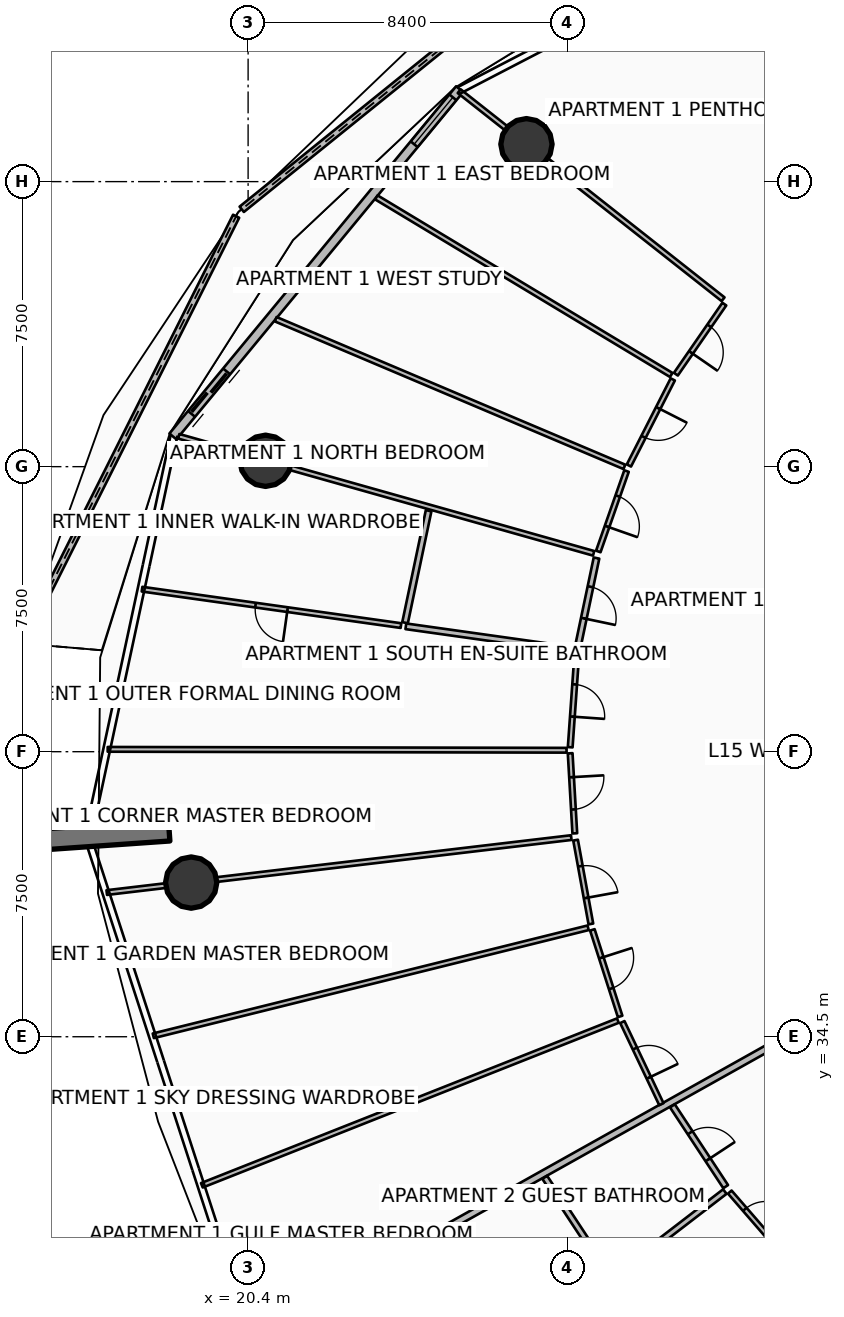
"""IFC4 building model, lengths in metres.
Left out: names, types, materials, properties, quantities, classifications, styles, units other than length and angle.
Written with IfcOpenShell. Run it as: python <this file> out.ifc"""

import sys

from ifc_helpers import new_model, si_unit, direction, frame, frame_2d, origin, origin_2d, place, context, subcontext, project, spatial, polyline, rectangle, circle, outline, extrude, element, fill, save


model = new_model("IFC4")
c1 = context("Model", 3, precision=1e-05, world=origin(), true_north=direction((0.0, 1.0)))
c2 = subcontext(c1, "Body", "Model", "MODEL_VIEW")
j1 = project(units=[si_unit("LENGTHUNIT", "METRE"), si_unit("PLANEANGLEUNIT", "RADIAN")], contexts=[c1])
p1 = place(None, origin())
s1 = spatial("IfcSite", under=j1, at=p1, CompositionType="ELEMENT")
p2 = place(p1, origin())
s2 = spatial("IfcBuilding", under=s1, at=p2, CompositionType="ELEMENT")
p3 = place(p2, frame((0.0, 0.0, 63.9)))
s3 = spatial("IfcBuildingStorey", under=s2, at=p3, CompositionType="ELEMENT", Elevation=63.9)
p4 = place(p3, frame((18.322, 39.925, 0.0), z_axis=(0.0, 0.0, 1.0), x_axis=(-0.997564163539, -0.069754853754, 0.0)))
e1 = element("IfcWall", 1, at=p4, inside=s3, PredefinedType="SOLIDWALL", context=c2, shape_type="SweptSolid", body=[
    extrude(rectangle(XDim=3.5, YDim=0.55, at=frame_2d((1.75, 0.0))), origin(), (0.0, 0.0, 1.0), 3.75),
])
for number, where, z_axis, x_axis in (
    (2, (27.724, 57.984, 0.0), (0.0, 0.0, 1.0), (1.0, 0.0, 0.0)),
    (3, (20.859, 49.655, 0.0), (0.0, 0.0, 1.0), (1.0, 0.0, 0.0)),
    (4, (18.902, 38.556, 0.0), (0.0, 0.0, 1.0), (1.0, 0.0, 0.0)),
):
    element("IfcColumn", number, at=place(p3, frame(where, z_axis=z_axis, x_axis=x_axis)), inside=s3, PredefinedType="COLUMN", context=c2, shape_type="SweptSolid", body=[
        extrude(circle(Radius=0.675, at=origin_2d()), origin(), (0.0, 0.0, 1.0), 3.5),
    ])
p5 = place(p3, frame((29.318, 63.605, 0.0), z_axis=(0.0, 0.0, 1.0), x_axis=(-0.778164801363, -0.628060141961, 0.0)))
e5 = element("IfcWall", 5, at=p5, inside=s3, PredefinedType="PARAPET", context=c2, shape_type="SweptSolid", body=[
    extrude(outline(polyline([(0.0, 0.0), (11.677, 0.0), (11.677, 1.148), (5.838, 1.127), (0.0, 1.224), (0.0, 0.0)])), frame((0.0, 0.09, 0.0), z_axis=(0.0, -1.0, 0.0), x_axis=(1.0, 0.0, 0.0)), (0.0, 0.0, 1.0), 0.18),
])
p6 = place(p3, frame((20.085, 56.089, 0.0), z_axis=(0.0, 0.0, 1.0), x_axis=(-0.448439969312, -0.893812952425, 0.0)))
e6 = element("IfcWall", 6, at=p6, inside=s3, PredefinedType="PARAPET", context=c2, shape_type="SweptSolid", body=[
    extrude(outline(polyline([(0.0, 0.0), (12.577, 0.0), (12.577, 1.483), (6.289, 1.284), (0.0, 1.148), (0.0, 0.0)])), frame((0.0, 0.09, 0.0), z_axis=(0.0, -1.0, 0.0), x_axis=(1.0, 0.0, 0.0)), (0.0, 0.0, 1.0), 0.18),
])
p7 = place(p3, frame((25.967, 59.433, 0.0), z_axis=(0.0, 0.0, 1.0), x_axis=(-0.636674332663, -0.771132799281, 0.0)))
e7 = element("IfcWall", 7, at=p7, inside=s3, PredefinedType="SOLIDWALL", context=c2, shape_type="SweptSolid", body=[
    extrude(rectangle(XDim=11.851, YDim=0.24, at=frame_2d((5.926, 0.0))), origin(), (0.0, 0.0, 1.0), 2.45),
])
p8 = place(p7, frame((9.631, 0.0, 0.0)))
e8 = element("IfcOpeningElement", 8, at=p8, cuts=e7, PredefinedType="OPENING", context=c2, shape_type="SweptSolid", body=[
    extrude(rectangle(XDim=1.45, YDim=2.15, at=frame_2d((0.725, 1.075))), frame((0.0, 0.13, 0.0), z_axis=(0.0, -1.0, 0.0), x_axis=(1.0, 0.0, 0.0)), (0.0, 0.0, 1.0), 0.26),
])
p9 = place(p7, frame((0.28, 0.0, 0.65)))
e9 = element("IfcOpeningElement", 9, at=p9, cuts=e7, PredefinedType="OPENING", context=c2, shape_type="SweptSolid", body=[
    extrude(rectangle(XDim=1.6, YDim=1.5, at=frame_2d((0.8, 0.75))), frame((0.0, 0.13, 0.0), z_axis=(0.0, -1.0, 0.0), x_axis=(1.0, 0.0, 0.0)), (0.0, 0.0, 1.0), 0.26),
])
p10 = place(p3, frame((34.954, 34.694, 0.0), z_axis=(0.0, 0.0, 1.0), x_axis=(-0.872493465611, -0.488625779577, 0.0)))
e10 = element("IfcWall", 10, at=p10, inside=s3, PredefinedType="PARTITIONING", context=c2, shape_type="SweptSolid", body=[
    extrude(rectangle(XDim=16.586, YDim=0.18, at=frame_2d((8.293, 0.0))), origin(), (0.0, 0.0, 1.0), 2.867),
])
p11 = place(p3, frame((32.898, 53.905, 0.0), z_axis=(0.0, 0.0, 1.0), x_axis=(-0.78532854108, 0.619079221558, 0.0)))
e11 = element("IfcWall", 11, at=p11, inside=s3, PredefinedType="PARTITIONING", context=c2, shape_type="SweptSolid", body=[
    extrude(rectangle(XDim=8.842, YDim=0.125, at=frame_2d((4.421, 0.0))), origin(), (0.0, 0.0, 1.0), 2.867),
])
p12 = place(p3, frame((31.534, 51.913, 0.0), z_axis=(0.0, 0.0, 1.0), x_axis=(-0.856706990958, 0.515803384676, 0.0)))
e12 = element("IfcWall", 12, at=p12, inside=s3, PredefinedType="PARTITIONING", context=c2, shape_type="SweptSolid", body=[
    extrude(rectangle(XDim=9.057, YDim=0.125, at=frame_2d((4.528, 0.0))), origin(), (0.0, 0.0, 1.0), 2.94),
])
p13 = place(p3, frame((30.301, 49.494, 0.0), z_axis=(0.0, 0.0, 1.0), x_axis=(-0.920840746031, 0.389938867579, 0.0)))
e13 = element("IfcWall", 13, at=p13, inside=s3, PredefinedType="PARTITIONING", context=c2, shape_type="SweptSolid", body=[
    extrude(rectangle(XDim=9.966, YDim=0.125, at=frame_2d((4.983, 0.0))), origin(), (0.0, 0.0, 1.0), 2.94),
])
p14 = place(p3, frame((32.931, 53.778, 0.0), z_axis=(0.0, 0.0, 1.0), x_axis=(-0.568541738061, -0.822654418382, 0.0)))
e14 = element("IfcWall", 14, at=p14, inside=s3, PredefinedType="PARTITIONING", context=c2, shape_type="SweptSolid", body=[
    extrude(rectangle(XDim=2.242, YDim=0.125, at=frame_2d((1.121, 0.0))), origin(), (0.0, 0.0, 1.0), 2.867),
])
p15 = place(p14, frame((0.696, 0.0, 0.0)))
e15 = element("IfcOpeningElement", 15, at=p15, cuts=e14, PredefinedType="OPENING", context=c2, shape_type="SweptSolid", body=[
    extrude(rectangle(XDim=0.85, YDim=2.06, at=frame_2d((0.425, 1.03))), frame((0.0, 0.073, 0.0), z_axis=(0.0, -1.0, 0.0), x_axis=(1.0, 0.0, 0.0)), (0.0, 0.0, 1.0), 0.145),
])
p16 = place(p3, frame((31.575, 51.796, 0.0), z_axis=(0.0, 0.0, 1.0), x_axis=(-0.454037986735, -0.890982326762, 0.0)))
e16 = element("IfcWall", 16, at=p16, inside=s3, PredefinedType="PARTITIONING", context=c2, shape_type="SweptSolid", body=[
    extrude(rectangle(XDim=2.542, YDim=0.125, at=frame_2d((1.271, 0.0))), origin(), (0.0, 0.0, 1.0), 2.94),
])
p17 = place(p16, frame((0.846, 0.0, 0.0)))
e17 = element("IfcOpeningElement", 17, at=p17, cuts=e16, PredefinedType="OPENING", context=c2, shape_type="SweptSolid", body=[
    extrude(rectangle(XDim=0.85, YDim=2.06, at=frame_2d((0.425, 1.03))), frame((0.0, 0.073, 0.0), z_axis=(0.0, -1.0, 0.0), x_axis=(1.0, 0.0, 0.0)), (0.0, 0.0, 1.0), 0.145),
])
p18 = place(p3, frame((30.358, 49.384, 0.0), z_axis=(0.0, 0.0, 1.0), x_axis=(-0.331344536708, -0.943509829304, 0.0)))
e18 = element("IfcWall", 18, at=p18, inside=s3, PredefinedType="PARTITIONING", context=c2, shape_type="SweptSolid", body=[
    extrude(rectangle(XDim=2.242, YDim=0.125, at=frame_2d((1.121, 0.0))), origin(), (0.0, 0.0, 1.0), 2.867),
])
p19 = place(p18, frame((0.696, 0.0, 0.0)))
e19 = element("IfcOpeningElement", 19, at=p19, cuts=e18, PredefinedType="OPENING", context=c2, shape_type="SweptSolid", body=[
    extrude(rectangle(XDim=0.85, YDim=2.06, at=frame_2d((0.425, 1.03))), frame((0.0, 0.073, 0.0), z_axis=(0.0, -1.0, 0.0), x_axis=(1.0, 0.0, 0.0)), (0.0, 0.0, 1.0), 0.145),
])
p20 = place(p3, frame((29.492, 47.22, 0.0), z_axis=(0.0, 0.0, 1.0), x_axis=(-0.962454721813, 0.271442274635, 0.0)))
e20 = element("IfcWall", 20, at=p20, inside=s3, PredefinedType="PARTITIONING", context=c2, shape_type="SweptSolid", body=[
    extrude(rectangle(XDim=11.344, YDim=0.125, at=frame_2d((5.672, 0.0))), origin(), (0.0, 0.0, 1.0), 2.867),
])
p21 = place(p3, frame((29.568, 47.095, 0.0), z_axis=(0.0, 0.0, 1.0), x_axis=(-0.205861309483, -0.978581177654, 0.0)))
e21 = element("IfcWall", 21, at=p21, inside=s3, PredefinedType="PARTITIONING", context=c2, shape_type="SweptSolid", body=[
    extrude(rectangle(XDim=2.392, YDim=0.15, at=frame_2d((1.196, 0.0))), origin(), (0.0, 0.0, 1.0), 2.867),
])
p22 = place(p21, frame((0.771, 0.0, 0.0)))
e22 = element("IfcOpeningElement", 22, at=p22, cuts=e21, PredefinedType="OPENING", context=c2, shape_type="SweptSolid", body=[
    extrude(rectangle(XDim=0.85, YDim=2.06, at=frame_2d((0.425, 1.03))), frame((0.0, 0.085, 0.0), z_axis=(0.0, -1.0, 0.0), x_axis=(1.0, 0.0, 0.0)), (0.0, 0.0, 1.0), 0.17),
])
p23 = place(p3, frame((25.15, 48.341, 0.0), z_axis=(0.0, 0.0, 1.0), x_axis=(-0.205879759174, -0.978577296264, 0.0)))
e23 = element("IfcWall", 23, at=p23, inside=s3, PredefinedType="PARTITIONING", context=c2, shape_type="SweptSolid", body=[
    extrude(rectangle(XDim=3.012, YDim=0.15, at=frame_2d((1.506, 0.0))), origin(), (0.0, 0.0, 1.0), 2.867),
])
p24 = place(p3, frame((28.968, 44.678, 0.0), z_axis=(0.0, 0.0, 1.0), x_axis=(-0.990240767804, 0.139367219172, 0.0)))
e24 = element("IfcWall", 24, at=p24, inside=s3, PredefinedType="PARTITIONING", context=c2, shape_type="SweptSolid", body=[
    extrude(rectangle(XDim=4.46, YDim=0.15, at=frame_2d((2.23, 0.0))), origin(), (0.0, 0.0, 1.0), 2.94),
])
p25 = place(p3, frame((24.422, 45.318, 0.0), z_axis=(0.0, 0.0, 1.0), x_axis=(-0.990243959665, 0.139344538274, 0.0)))
e25 = element("IfcWall", 25, at=p25, inside=s3, PredefinedType="PARTITIONING", context=c2, shape_type="SweptSolid", body=[
    extrude(rectangle(XDim=6.88, YDim=0.125, at=frame_2d((3.44, 0.0))), origin(), (0.0, 0.0, 1.0), 2.94),
])
p26 = place(p25, frame((3.015, 0.0, 0.0)))
e26 = element("IfcOpeningElement", 26, at=p26, cuts=e25, PredefinedType="OPENING", context=c2, shape_type="SweptSolid", body=[
    extrude(rectangle(XDim=0.85, YDim=2.06, at=frame_2d((0.425, 1.03))), frame((0.0, 0.073, 0.0), z_axis=(0.0, -1.0, 0.0), x_axis=(1.0, 0.0, 0.0)), (0.0, 0.0, 1.0), 0.145),
])
p27 = place(p3, frame((28.78, 42.038, 0.0), z_axis=(0.0, 0.0, 1.0), x_axis=(-0.999998036955, 0.001981435282, 0.0)))
e27 = element("IfcWall", 27, at=p27, inside=s3, PredefinedType="PARTITIONING", context=c2, shape_type="SweptSolid", body=[
    extrude(rectangle(XDim=12.075, YDim=0.125, at=frame_2d((6.038, 0.0))), origin(), (0.0, 0.0, 1.0), 2.94),
])
p28 = place(p3, frame((29.05, 44.576, 0.0), z_axis=(0.0, 0.0, 1.0), x_axis=(-0.070831673661, -0.997488282641, 0.0)))
e28 = element("IfcWall", 28, at=p28, inside=s3, PredefinedType="PARTITIONING", context=c2, shape_type="SweptSolid", body=[
    extrude(rectangle(XDim=2.464, YDim=0.125, at=frame_2d((1.232, 0.0))), origin(), (0.0, 0.0, 1.0), 2.94),
])
p29 = place(p28, frame((0.807, 0.0, 0.0)))
e29 = element("IfcOpeningElement", 29, at=p29, cuts=e28, PredefinedType="OPENING", context=c2, shape_type="SweptSolid", body=[
    extrude(rectangle(XDim=0.85, YDim=2.06, at=frame_2d((0.425, 1.03))), frame((0.0, 0.073, 0.0), z_axis=(0.0, -1.0, 0.0), x_axis=(1.0, 0.0, 0.0)), (0.0, 0.0, 1.0), 0.145),
])
p30 = place(p3, frame((28.875, 41.958, 0.0), z_axis=(0.0, 0.0, 1.0), x_axis=(0.057962417622, -0.998318765797, 0.0)))
e30 = element("IfcWall", 30, at=p30, inside=s3, PredefinedType="PARTITIONING", context=c2, shape_type="SweptSolid", body=[
    extrude(rectangle(XDim=2.11, YDim=0.125, at=frame_2d((1.055, 0.0))), origin(), (0.0, 0.0, 1.0), 2.867),
])
p31 = place(p30, frame((0.63, 0.0, 0.0)))
e31 = element("IfcOpeningElement", 31, at=p31, cuts=e30, PredefinedType="OPENING", context=c2, shape_type="SweptSolid", body=[
    extrude(rectangle(XDim=0.85, YDim=2.06, at=frame_2d((0.425, 1.03))), frame((0.0, 0.073, 0.0), z_axis=(0.0, -1.0, 0.0), x_axis=(1.0, 0.0, 0.0)), (0.0, 0.0, 1.0), 0.145),
])
p32 = place(p3, frame((28.903, 39.74, 0.0), z_axis=(0.0, 0.0, 1.0), x_axis=(-0.993068040113, -0.117540919282, 0.0)))
e32 = element("IfcWall", 32, at=p32, inside=s3, PredefinedType="PARTITIONING", context=c2, shape_type="SweptSolid", body=[
    extrude(rectangle(XDim=12.309, YDim=0.125, at=frame_2d((6.154, 0.0))), origin(), (0.0, 0.0, 1.0), 2.867),
])
p33 = place(p3, frame((29.347, 37.366, 0.0), z_axis=(0.0, 0.0, 1.0), x_axis=(-0.970510462135, -0.241059002917, 0.0)))
e33 = element("IfcWall", 33, at=p33, inside=s3, PredefinedType="PARTITIONING", context=c2, shape_type="SweptSolid", body=[
    extrude(rectangle(XDim=11.79, YDim=0.125, at=frame_2d((5.895, 0.0))), origin(), (0.0, 0.0, 1.0), 2.94),
])
p34 = place(p3, frame((30.13, 34.925, 0.0), z_axis=(0.0, 0.0, 1.0), x_axis=(-0.929770978957, -0.368138461302, 0.0)))
e34 = element("IfcWall", 34, at=p34, inside=s3, PredefinedType="PARTITIONING", context=c2, shape_type="SweptSolid", body=[
    extrude(rectangle(XDim=11.773, YDim=0.125, at=frame_2d((5.887, 0.0))), origin(), (0.0, 0.0, 1.0), 2.94),
])
p35 = place(p3, frame((29.017, 39.673, 0.0), z_axis=(0.0, 0.0, 1.0), x_axis=(0.179632658462, -0.983733758704, 0.0)))
e35 = element("IfcWall", 35, at=p35, inside=s3, PredefinedType="PARTITIONING", context=c2, shape_type="SweptSolid", body=[
    extrude(rectangle(XDim=2.242, YDim=0.125, at=frame_2d((1.121, 0.0))), origin(), (0.0, 0.0, 1.0), 2.867),
])
p36 = place(p35, frame((0.696, 0.0, 0.0)))
e36 = element("IfcOpeningElement", 36, at=p36, cuts=e35, PredefinedType="OPENING", context=c2, shape_type="SweptSolid", body=[
    extrude(rectangle(XDim=0.85, YDim=2.06, at=frame_2d((0.425, 1.03))), frame((0.0, 0.073, 0.0), z_axis=(0.0, -1.0, 0.0), x_axis=(1.0, 0.0, 0.0)), (0.0, 0.0, 1.0), 0.145),
])
p37 = place(p3, frame((29.458, 37.312, 0.0), z_axis=(0.0, 0.0, 1.0), x_axis=(0.305338513131, -0.952243872335, 0.0)))
e37 = element("IfcWall", 37, at=p37, inside=s3, PredefinedType="PARTITIONING", context=c2, shape_type="SweptSolid", body=[
    extrude(rectangle(XDim=2.392, YDim=0.125, at=frame_2d((1.196, 0.0))), origin(), (0.0, 0.0, 1.0), 2.94),
])
p38 = place(p37, frame((0.771, 0.0, 0.0)))
e38 = element("IfcOpeningElement", 38, at=p38, cuts=e37, PredefinedType="OPENING", context=c2, shape_type="SweptSolid", body=[
    extrude(rectangle(XDim=0.85, YDim=2.06, at=frame_2d((0.425, 1.03))), frame((0.0, 0.073, 0.0), z_axis=(0.0, -1.0, 0.0), x_axis=(1.0, 0.0, 0.0)), (0.0, 0.0, 1.0), 0.145),
])
p39 = place(p3, frame((30.248, 34.885, 0.0), z_axis=(0.0, 0.0, 1.0), x_axis=(0.429366977128, -0.903130111862, 0.0)))
e39 = element("IfcWall", 39, at=p39, inside=s3, PredefinedType="PARTITIONING", context=c2, shape_type="SweptSolid", body=[
    extrude(rectangle(XDim=2.392, YDim=0.125, at=frame_2d((1.196, 0.0))), origin(), (0.0, 0.0, 1.0), 2.867),
])
p40 = place(p39, frame((0.771, 0.0, 0.0)))
e40 = element("IfcOpeningElement", 40, at=p40, cuts=e39, PredefinedType="OPENING", context=c2, shape_type="SweptSolid", body=[
    extrude(rectangle(XDim=0.85, YDim=2.06, at=frame_2d((0.425, 1.03))), frame((0.0, 0.073, 0.0), z_axis=(0.0, -1.0, 0.0), x_axis=(1.0, 0.0, 0.0)), (0.0, 0.0, 1.0), 0.145),
])
p41 = place(p3, frame((31.565, 32.682, 0.0), z_axis=(0.0, 0.0, 1.0), x_axis=(0.550533618108, -0.834812994229, 0.0)))
e41 = element("IfcWall", 41, at=p41, inside=s3, PredefinedType="PARTITIONING", context=c2, shape_type="SweptSolid", body=[
    extrude(rectangle(XDim=2.546, YDim=0.15, at=frame_2d((1.273, 0.0))), origin(), (0.0, 0.0, 1.0), 2.867),
])
p42 = place(p41, frame((0.848, 0.0, 0.0)))
e42 = element("IfcOpeningElement", 42, at=p42, cuts=e41, PredefinedType="OPENING", context=c2, shape_type="SweptSolid", body=[
    extrude(rectangle(XDim=0.85, YDim=2.06, at=frame_2d((0.425, 1.03))), frame((0.0, 0.085, 0.0), z_axis=(0.0, -1.0, 0.0), x_axis=(1.0, 0.0, 0.0)), (0.0, 0.0, 1.0), 0.17),
])
p43 = place(p3, frame((28.206, 30.8, 0.0), z_axis=(0.0, 0.0, 1.0), x_axis=(0.550481610401, -0.834847289395, 0.0)))
e43 = element("IfcWall", 43, at=p43, inside=s3, PredefinedType="PARTITIONING", context=c2, shape_type="SweptSolid", body=[
    extrude(rectangle(XDim=3.104, YDim=0.15, at=frame_2d((1.552, 0.0))), origin(), (0.0, 0.0, 1.0), 2.867),
])
p44 = place(p3, frame((32.945, 30.426, 0.0), z_axis=(0.0, 0.0, 1.0), x_axis=(-0.79279229966, -0.609491894614, 0.0)))
e44 = element("IfcWall", 44, at=p44, inside=s3, PredefinedType="PARTITIONING", context=c2, shape_type="SweptSolid", body=[
    extrude(rectangle(XDim=3.72, YDim=0.15, at=frame_2d((1.86, 0.0))), origin(), (0.0, 0.0, 1.0), 2.94),
])
p45 = place(p3, frame((33.075, 30.413, 0.0), z_axis=(0.0, 0.0, 1.0), x_axis=(0.655021066846, -0.755610615322, 0.0)))
e45 = element("IfcWall", 45, at=p45, inside=s3, PredefinedType="PARTITIONING", context=c2, shape_type="SweptSolid", body=[
    extrude(rectangle(XDim=2.053, YDim=0.125, at=frame_2d((1.027, 0.0))), origin(), (0.0, 0.0, 1.0), 2.94),
])
p46 = place(p45, frame((0.602, 0.0, 0.0)))
e46 = element("IfcOpeningElement", 46, at=p46, cuts=e45, PredefinedType="OPENING", context=c2, shape_type="SweptSolid", body=[
    extrude(rectangle(XDim=0.85, YDim=2.06, at=frame_2d((0.425, 1.03))), frame((0.0, 0.073, 0.0), z_axis=(0.0, -1.0, 0.0), x_axis=(1.0, 0.0, 0.0)), (0.0, 0.0, 1.0), 0.145),
])
p47 = place(p8, origin())
e47 = element("IfcDoor", 47, at=p47, inside=s3, OperationType="DOUBLE_DOOR_SLIDING", PredefinedType="DOOR", context=c2, shape_type="SweptSolid", body=[
    extrude(rectangle(XDim=1.45, YDim=2.15, at=frame_2d((0.725, 1.075))), frame((0.0, 0.025, 0.0), z_axis=(0.0, -1.0, 0.0), x_axis=(1.0, 0.0, 0.0)), (0.0, 0.0, 1.0), 0.05),
])
fill(e8, e47)
p48 = place(p9, origin())
e48 = element("IfcWindow", 48, at=p48, inside=s3, PartitioningType="SINGLE_PANEL", PredefinedType="WINDOW", context=c2, shape_type="SweptSolid", body=[
    extrude(rectangle(XDim=1.6, YDim=1.5, at=frame_2d((0.8, 0.75))), frame((0.0, 0.03, 0.0), z_axis=(0.0, -1.0, 0.0), x_axis=(1.0, 0.0, 0.0)), (0.0, 0.0, 1.0), 0.06),
])
fill(e9, e48)
p49 = place(p15, origin())
e49 = element("IfcDoor", 49, at=p49, inside=s3, OperationType="SINGLE_SWING_RIGHT", PredefinedType="DOOR", context=c2, shape_type="SweptSolid", body=[
    extrude(rectangle(XDim=0.85, YDim=2.06, at=frame_2d((0.425, 1.03))), frame((0.0, 0.025, 0.0), z_axis=(0.0, -1.0, 0.0), x_axis=(1.0, 0.0, 0.0)), (0.0, 0.0, 1.0), 0.05),
])
fill(e15, e49)
p50 = place(p17, origin())
e50 = element("IfcDoor", 50, at=p50, inside=s3, OperationType="SINGLE_SWING_LEFT", PredefinedType="DOOR", context=c2, shape_type="SweptSolid", body=[
    extrude(rectangle(XDim=0.85, YDim=2.06, at=frame_2d((0.425, 1.03))), frame((0.0, 0.025, 0.0), z_axis=(0.0, -1.0, 0.0), x_axis=(1.0, 0.0, 0.0)), (0.0, 0.0, 1.0), 0.05),
])
fill(e17, e50)
p51 = place(p19, origin())
e51 = element("IfcDoor", 51, at=p51, inside=s3, OperationType="SINGLE_SWING_RIGHT", PredefinedType="DOOR", context=c2, shape_type="SweptSolid", body=[
    extrude(rectangle(XDim=0.85, YDim=2.06, at=frame_2d((0.425, 1.03))), frame((0.0, 0.025, 0.0), z_axis=(0.0, -1.0, 0.0), x_axis=(1.0, 0.0, 0.0)), (0.0, 0.0, 1.0), 0.05),
])
fill(e19, e51)
p52 = place(p22, origin())
e52 = element("IfcDoor", 52, at=p52, inside=s3, OperationType="SINGLE_SWING_RIGHT", PredefinedType="DOOR", context=c2, shape_type="SweptSolid", body=[
    extrude(rectangle(XDim=0.85, YDim=2.06, at=frame_2d((0.425, 1.03))), frame((0.0, 0.025, 0.0), z_axis=(0.0, -1.0, 0.0), x_axis=(1.0, 0.0, 0.0)), (0.0, 0.0, 1.0), 0.05),
])
fill(e22, e52)
p53 = place(p26, origin())
e53 = element("IfcDoor", 53, at=p53, inside=s3, OperationType="SINGLE_SWING_LEFT", PredefinedType="DOOR", context=c2, shape_type="SweptSolid", body=[
    extrude(rectangle(XDim=0.85, YDim=2.06, at=frame_2d((0.425, 1.03))), frame((0.0, 0.025, 0.0), z_axis=(0.0, -1.0, 0.0), x_axis=(1.0, 0.0, 0.0)), (0.0, 0.0, 1.0), 0.05),
])
fill(e26, e53)
p54 = place(p29, origin())
e54 = element("IfcDoor", 54, at=p54, inside=s3, OperationType="SINGLE_SWING_RIGHT", PredefinedType="DOOR", context=c2, shape_type="SweptSolid", body=[
    extrude(rectangle(XDim=0.85, YDim=2.06, at=frame_2d((0.425, 1.03))), frame((0.0, 0.025, 0.0), z_axis=(0.0, -1.0, 0.0), x_axis=(1.0, 0.0, 0.0)), (0.0, 0.0, 1.0), 0.05),
])
fill(e29, e54)
p55 = place(p31, origin())
e55 = element("IfcDoor", 55, at=p55, inside=s3, OperationType="SINGLE_SWING_LEFT", PredefinedType="DOOR", context=c2, shape_type="SweptSolid", body=[
    extrude(rectangle(XDim=0.85, YDim=2.06, at=frame_2d((0.425, 1.03))), frame((0.0, 0.025, 0.0), z_axis=(0.0, -1.0, 0.0), x_axis=(1.0, 0.0, 0.0)), (0.0, 0.0, 1.0), 0.05),
])
fill(e31, e55)
p56 = place(p36, origin())
e56 = element("IfcDoor", 56, at=p56, inside=s3, OperationType="SINGLE_SWING_RIGHT", PredefinedType="DOOR", context=c2, shape_type="SweptSolid", body=[
    extrude(rectangle(XDim=0.85, YDim=2.06, at=frame_2d((0.425, 1.03))), frame((0.0, 0.025, 0.0), z_axis=(0.0, -1.0, 0.0), x_axis=(1.0, 0.0, 0.0)), (0.0, 0.0, 1.0), 0.05),
])
fill(e36, e56)
p57 = place(p38, origin())
e57 = element("IfcDoor", 57, at=p57, inside=s3, OperationType="SINGLE_SWING_LEFT", PredefinedType="DOOR", context=c2, shape_type="SweptSolid", body=[
    extrude(rectangle(XDim=0.85, YDim=2.06, at=frame_2d((0.425, 1.03))), frame((0.0, 0.025, 0.0), z_axis=(0.0, -1.0, 0.0), x_axis=(1.0, 0.0, 0.0)), (0.0, 0.0, 1.0), 0.05),
])
fill(e38, e57)
p58 = place(p40, origin())
e58 = element("IfcDoor", 58, at=p58, inside=s3, OperationType="SINGLE_SWING_RIGHT", PredefinedType="DOOR", context=c2, shape_type="SweptSolid", body=[
    extrude(rectangle(XDim=0.85, YDim=2.06, at=frame_2d((0.425, 1.03))), frame((0.0, 0.025, 0.0), z_axis=(0.0, -1.0, 0.0), x_axis=(1.0, 0.0, 0.0)), (0.0, 0.0, 1.0), 0.05),
])
fill(e40, e58)
p59 = place(p42, origin())
e59 = element("IfcDoor", 59, at=p59, inside=s3, OperationType="SINGLE_SWING_RIGHT", PredefinedType="DOOR", context=c2, shape_type="SweptSolid", body=[
    extrude(rectangle(XDim=0.85, YDim=2.06, at=frame_2d((0.425, 1.03))), frame((0.0, 0.025, 0.0), z_axis=(0.0, -1.0, 0.0), x_axis=(1.0, 0.0, 0.0)), (0.0, 0.0, 1.0), 0.05),
])
fill(e42, e59)
p60 = place(p46, origin())
e60 = element("IfcDoor", 60, at=p60, inside=s3, OperationType="SINGLE_SWING_RIGHT", PredefinedType="DOOR", context=c2, shape_type="SweptSolid", body=[
    extrude(rectangle(XDim=0.85, YDim=2.06, at=frame_2d((0.425, 1.03))), frame((0.0, 0.025, 0.0), z_axis=(0.0, -1.0, 0.0), x_axis=(1.0, 0.0, 0.0)), (0.0, 0.0, 1.0), 0.05),
])
fill(e46, e60)
save(model, sys.argv[1])
